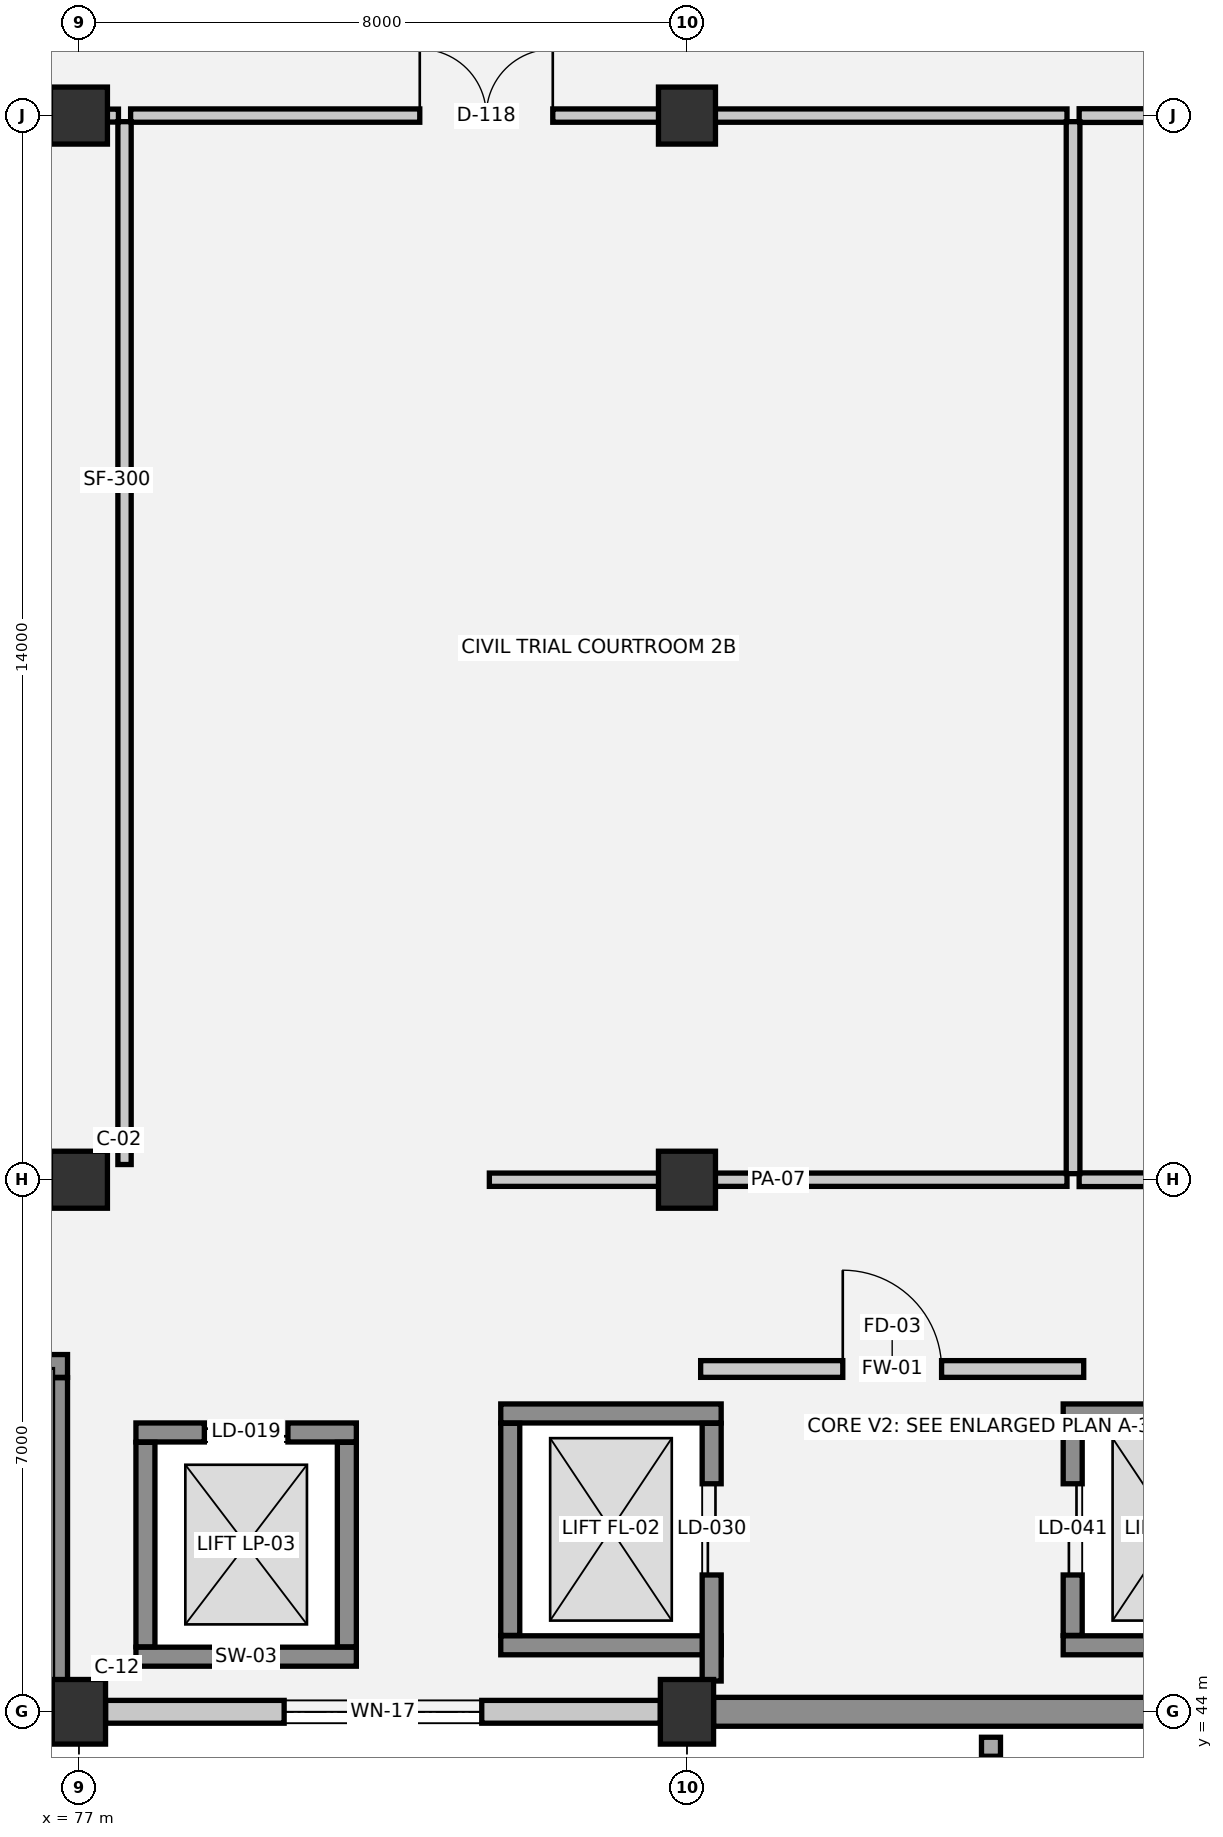
"""IFC4 building model, lengths in metres.
Left out: names, types, materials, properties, quantities, classifications, styles, units other than length and angle.
Written with IfcOpenShell. Run it as: python <this file> out.ifc"""

import sys

from ifc_helpers import new_model, si_unit, direction, frame, frame_2d, origin, origin_2d, place, context, subcontext, project, spatial, rectangle, extrude, element, fill, save


model = new_model("IFC4")
c1 = context("Model", 3, precision=1e-05, world=origin(), true_north=direction((0.0, 1.0)))
c2 = subcontext(c1, "Body", "Model", "MODEL_VIEW")
j1 = project(units=[si_unit("LENGTHUNIT", "METRE"), si_unit("PLANEANGLEUNIT", "RADIAN")], contexts=[c1])
p1 = place(None, origin())
s1 = spatial("IfcSite", under=j1, at=p1, CompositionType="ELEMENT")
p2 = place(p1, origin())
s2 = spatial("IfcBuilding", under=s1, at=p2, CompositionType="ELEMENT")
p3 = place(p2, frame((0.0, 0.0, 5.4)))
s3 = spatial("IfcBuildingStorey", under=s2, at=p3, CompositionType="ELEMENT", Elevation=5.4)
p4 = place(p3, frame((77.0, 44.0, 0.0), z_axis=(0.0, 0.0, 1.0), x_axis=(1.0, 0.0, 0.0)))
e1 = element("IfcColumn", 1, at=p4, inside=s3, PredefinedType="COLUMN", context=c2, shape_type="SweptSolid", body=[
    extrude(rectangle(XDim=0.7, YDim=0.85, at=origin_2d()), origin(), (0.0, 0.0, 1.0), 4.5),
])
for number, where, z_axis, x_axis in (
    (2, (77.0, 51.0, 0.0), (0.0, 0.0, 1.0), (1.0, 0.0, 0.0)),
    (3, (77.0, 65.0, 0.0), (0.0, 0.0, 1.0), (1.0, 0.0, 0.0)),
):
    element("IfcColumn", number, at=place(p3, frame(where, z_axis=z_axis, x_axis=x_axis)), inside=s3, PredefinedType="COLUMN", context=c2, shape_type="SweptSolid", body=[
        extrude(rectangle(XDim=0.75, YDim=0.75, at=origin_2d()), origin(), (0.0, 0.0, 1.0), 4.5),
    ])
p5 = place(p3, frame((85.0, 44.0, 0.0), z_axis=(0.0, 0.0, 1.0), x_axis=(1.0, 0.0, 0.0)))
e4 = element("IfcColumn", 4, at=p5, inside=s3, PredefinedType="COLUMN", context=c2, shape_type="SweptSolid", body=[
    extrude(rectangle(XDim=0.7, YDim=0.85, at=origin_2d()), origin(), (0.0, 0.0, 1.0), 4.5),
])
for number, where, z_axis, x_axis in (
    (5, (85.0, 51.0, 0.0), (0.0, 0.0, 1.0), (1.0, 0.0, 0.0)),
    (6, (85.0, 65.0, 0.0), (0.0, 0.0, 1.0), (1.0, 0.0, 0.0)),
):
    element("IfcColumn", number, at=place(p3, frame(where, z_axis=z_axis, x_axis=x_axis)), inside=s3, PredefinedType="COLUMN", context=c2, shape_type="SweptSolid", body=[
        extrude(rectangle(XDim=0.75, YDim=0.75, at=origin_2d()), origin(), (0.0, 0.0, 1.0), 4.5),
    ])
p6 = place(p3, frame((92.65, 44.0, 0.0), z_axis=(0.0, 0.0, 1.0), x_axis=(-1.0, 0.0, 0.0)))
e7 = element("IfcWall", 7, at=p6, inside=s3, PredefinedType="STANDARD", context=c2, shape_type="SweptSolid", body=[
    extrude(rectangle(XDim=7.3, YDim=0.38, at=frame_2d((3.65, 0.0))), origin(), (0.0, 0.0, 1.0), 3.23),
])
p7 = place(p3, frame((84.65, 44.0, 0.0), z_axis=(0.0, 0.0, 1.0), x_axis=(-1.0, 0.0, 0.0)))
e8 = element("IfcWall", 8, at=p7, inside=s3, PredefinedType="SOLIDWALL", context=c2, shape_type="SweptSolid", body=[
    extrude(rectangle(XDim=7.3, YDim=0.3, at=frame_2d((3.65, 0.0))), origin(), (0.0, 0.0, 1.0), 3.23),
])
p8 = place(p7, frame((2.35, 0.0, 1.0)))
e9 = element("IfcOpeningElement", 9, at=p8, cuts=e8, PredefinedType="OPENING", context=c2, shape_type="SweptSolid", body=[
    extrude(rectangle(XDim=2.6, YDim=1.1, at=frame_2d((1.3, 0.55))), frame((0.0, 0.16, 0.0), z_axis=(0.0, -1.0, 0.0), x_axis=(1.0, 0.0, 0.0)), (0.0, 0.0, 1.0), 0.32),
])
p9 = place(p3, frame((77.75, 44.725, 0.0), z_axis=(0.0, 0.0, 1.0), x_axis=(1.0, 0.0, 0.0)))
e10 = element("IfcWall", 10, at=p9, inside=s3, PredefinedType="SHEAR", context=c2, shape_type="SweptSolid", body=[
    extrude(rectangle(XDim=2.9, YDim=0.25, at=frame_2d((1.45, 0.0))), origin(), (0.0, 0.0, 1.0), 4.5),
])
p10 = place(p3, frame((80.65, 47.675, 0.0), z_axis=(0.0, 0.0, 1.0), x_axis=(-1.0, 0.0, 0.0)))
e11 = element("IfcWall", 11, at=p10, inside=s3, PredefinedType="SHEAR", context=c2, shape_type="SweptSolid", body=[
    extrude(rectangle(XDim=2.9, YDim=0.25, at=frame_2d((1.45, 0.0))), origin(), (0.0, 0.0, 1.0), 4.5),
])
p11 = place(p10, frame((0.9, 0.0, 0.0)))
e12 = element("IfcOpeningElement", 12, at=p11, cuts=e11, PredefinedType="OPENING", context=c2, shape_type="SweptSolid", body=[
    extrude(rectangle(XDim=1.1, YDim=2.15, at=frame_2d((0.55, 1.075))), frame((0.0, 0.135, 0.0), z_axis=(0.0, -1.0, 0.0), x_axis=(1.0, 0.0, 0.0)), (0.0, 0.0, 1.0), 0.27),
])
for number, where, z_axis, x_axis in (
    (13, (77.875, 47.545, 0.0), (0.0, 0.0, 1.0), (0.0, -1.0, 0.0)),
    (14, (80.525, 44.855, 0.0), (0.0, 0.0, 1.0), (0.0, 1.0, 0.0)),
):
    element("IfcWall", number, at=place(p3, frame(where, z_axis=z_axis, x_axis=x_axis)), inside=s3, PredefinedType="SHEAR", context=c2, shape_type="SweptSolid", body=[
        extrude(rectangle(XDim=2.69, YDim=0.25, at=frame_2d((1.345, 0.0))), origin(), (0.0, 0.0, 1.0), 4.5),
    ])
for number, where, z_axis, x_axis in (
    (15, (82.55, 44.875, 0.0), (0.0, 0.0, 1.0), (1.0, 0.0, 0.0)),
    (16, (85.45, 47.925, 0.0), (0.0, 0.0, 1.0), (-1.0, 0.0, 0.0)),
):
    element("IfcWall", number, at=place(p3, frame(where, z_axis=z_axis, x_axis=x_axis)), inside=s3, PredefinedType="SHEAR", context=c2, shape_type="SweptSolid", body=[
        extrude(rectangle(XDim=2.9, YDim=0.25, at=frame_2d((1.45, 0.0))), origin(), (0.0, 0.0, 1.0), 4.5),
    ])
p12 = place(p3, frame((82.675, 47.795, 0.0), z_axis=(0.0, 0.0, 1.0), x_axis=(0.0, -1.0, 0.0)))
e17 = element("IfcWall", 17, at=p12, inside=s3, PredefinedType="SHEAR", context=c2, shape_type="SweptSolid", body=[
    extrude(rectangle(XDim=2.79, YDim=0.25, at=frame_2d((1.395, 0.0))), origin(), (0.0, 0.0, 1.0), 4.5),
])
p13 = place(p3, frame((85.325, 44.405, 0.0), z_axis=(0.0, 0.0, 1.0), x_axis=(0.0, 1.0, 0.0)))
e18 = element("IfcWall", 18, at=p13, inside=s3, PredefinedType="SHEAR", context=c2, shape_type="SweptSolid", body=[
    extrude(rectangle(XDim=3.39, YDim=0.25, at=frame_2d((1.695, 0.0))), origin(), (0.0, 0.0, 1.0), 4.5),
])
p14 = place(p13, frame((1.395, 0.0, 0.0)))
e19 = element("IfcOpeningElement", 19, at=p14, cuts=e18, PredefinedType="OPENING", context=c2, shape_type="SweptSolid", body=[
    extrude(rectangle(XDim=1.2, YDim=2.2, at=frame_2d((0.6, 1.1))), frame((0.0, 0.135, 0.0), z_axis=(0.0, -1.0, 0.0), x_axis=(1.0, 0.0, 0.0)), (0.0, 0.0, 1.0), 0.27),
])
for number, where, z_axis, x_axis in (
    (20, (89.95, 44.875, 0.0), (0.0, 0.0, 1.0), (1.0, 0.0, 0.0)),
    (21, (92.85, 47.925, 0.0), (0.0, 0.0, 1.0), (-1.0, 0.0, 0.0)),
):
    element("IfcWall", number, at=place(p3, frame(where, z_axis=z_axis, x_axis=x_axis)), inside=s3, PredefinedType="SHEAR", context=c2, shape_type="SweptSolid", body=[
        extrude(rectangle(XDim=2.9, YDim=0.25, at=frame_2d((1.45, 0.0))), origin(), (0.0, 0.0, 1.0), 4.5),
    ])
p15 = place(p3, frame((90.075, 47.795, 0.0), z_axis=(0.0, 0.0, 1.0), x_axis=(0.0, -1.0, 0.0)))
e22 = element("IfcWall", 22, at=p15, inside=s3, PredefinedType="SHEAR", context=c2, shape_type="SweptSolid", body=[
    extrude(rectangle(XDim=2.79, YDim=0.25, at=frame_2d((1.395, 0.0))), origin(), (0.0, 0.0, 1.0), 4.5),
])
p16 = place(p15, frame((0.795, 0.0, 0.0)))
e23 = element("IfcOpeningElement", 23, at=p16, cuts=e22, PredefinedType="OPENING", context=c2, shape_type="SweptSolid", body=[
    extrude(rectangle(XDim=1.2, YDim=2.2, at=frame_2d((0.6, 1.1))), frame((0.0, 0.135, 0.0), z_axis=(0.0, -1.0, 0.0), x_axis=(1.0, 0.0, 0.0)), (0.0, 0.0, 1.0), 0.27),
])
p17 = place(p3, frame((76.85, 48.55, 0.0), z_axis=(0.0, 0.0, 1.0), x_axis=(-1.0, 0.0, 0.0)))
e24 = element("IfcWall", 24, at=p17, inside=s3, PredefinedType="SHEAR", context=c2, shape_type="SweptSolid", body=[
    extrude(rectangle(XDim=7.7, YDim=0.3, at=frame_2d((3.85, 0.0))), origin(), (0.0, 0.0, 1.0), 4.2),
])
p18 = place(p17, frame((6.025, 0.0, 0.0)))
e25 = element("IfcOpeningElement", 25, at=p18, cuts=e24, PredefinedType="OPENING", context=c2, shape_type="SweptSolid", body=[
    extrude(rectangle(XDim=1.25, YDim=2.15, at=frame_2d((0.625, 1.075))), frame((0.0, 0.16, 0.0), z_axis=(0.0, -1.0, 0.0), x_axis=(1.0, 0.0, 0.0)), (0.0, 0.0, 1.0), 0.32),
])
p19 = place(p3, frame((76.7, 44.195, 0.0), z_axis=(0.0, 0.0, 1.0), x_axis=(0.0, 1.0, 0.0)))
e26 = element("IfcWall", 26, at=p19, inside=s3, PredefinedType="SHEAR", context=c2, shape_type="SweptSolid", body=[
    extrude(rectangle(XDim=4.2, YDim=0.3, at=frame_2d((2.1, 0.0))), origin(), (0.0, 0.0, 1.0), 4.2),
])
p20 = place(p3, frame((85.18, 48.51, 0.0), z_axis=(0.0, 0.0, 1.0), x_axis=(1.0, 0.0, 0.0)))
e27 = element("IfcWall", 27, at=p20, inside=s3, PredefinedType="SOLIDWALL", context=c2, shape_type="SweptSolid", body=[
    extrude(rectangle(XDim=5.04, YDim=0.22, at=frame_2d((2.52, 0.0))), origin(), (0.0, 0.0, 1.0), 4.2),
])
p21 = place(p20, frame((1.87, 0.0, 0.0)))
e28 = element("IfcOpeningElement", 28, at=p21, cuts=e27, PredefinedType="OPENING", context=c2, shape_type="SweptSolid", body=[
    extrude(rectangle(XDim=1.3, YDim=2.15, at=frame_2d((0.65, 1.075))), frame((0.0, 0.12, 0.0), z_axis=(0.0, -1.0, 0.0), x_axis=(1.0, 0.0, 0.0)), (0.0, 0.0, 1.0), 0.24),
])
p22 = place(p3, frame((62.08, 51.0, 0.0), z_axis=(0.0, 0.0, 1.0), x_axis=(1.0, 0.0, 0.0)))
e29 = element("IfcWall", 29, at=p22, inside=s3, PredefinedType="PARTITIONING", context=c2, shape_type="SweptSolid", body=[
    extrude(rectangle(XDim=15.12, YDim=0.17, at=frame_2d((7.56, 0.0))), origin(), (0.0, 0.0, 1.0), 3.4),
])
p23 = place(p3, frame((82.4, 51.0, 0.0), z_axis=(0.0, 0.0, 1.0), x_axis=(1.0, 0.0, 0.0)))
e30 = element("IfcWall", 30, at=p23, inside=s3, PredefinedType="PARTITIONING", context=c2, shape_type="SweptSolid", body=[
    extrude(rectangle(XDim=7.6, YDim=0.175, at=frame_2d((3.8, 0.0))), origin(), (0.0, 0.0, 1.0), 3.4),
])
p24 = place(p3, frame((90.16, 51.0, 0.0), z_axis=(0.0, 0.0, 1.0), x_axis=(1.0, 0.0, 0.0)))
e31 = element("IfcWall", 31, at=p24, inside=s3, PredefinedType="PARTITIONING", context=c2, shape_type="SweptSolid", body=[
    extrude(rectangle(XDim=8.16, YDim=0.18, at=frame_2d((4.08, 0.0))), origin(), (0.0, 0.0, 1.0), 3.4),
])
p25 = place(p3, frame((62.08, 65.0, 0.0), z_axis=(0.0, 0.0, 1.0), x_axis=(1.0, 0.0, 0.0)))
e32 = element("IfcWall", 32, at=p25, inside=s3, PredefinedType="PARTITIONING", context=c2, shape_type="SweptSolid", body=[
    extrude(rectangle(XDim=15.44, YDim=0.17, at=frame_2d((7.72, 0.0))), origin(), (0.0, 0.0, 1.0), 3.4),
])
p26 = place(p25, frame((8.826, 0.0, 0.0)))
e33 = element("IfcOpeningElement", 33, at=p26, cuts=e32, PredefinedType="OPENING", context=c2, shape_type="SweptSolid", body=[
    extrude(rectangle(XDim=1.7, YDim=2.3, at=frame_2d((0.85, 1.15))), frame((0.0, 0.095, 0.0), z_axis=(0.0, -1.0, 0.0), x_axis=(1.0, 0.0, 0.0)), (0.0, 0.0, 1.0), 0.19),
])
p27 = place(p3, frame((77.68, 65.0, 0.0), z_axis=(0.0, 0.0, 1.0), x_axis=(1.0, 0.0, 0.0)))
e34 = element("IfcWall", 34, at=p27, inside=s3, PredefinedType="PARTITIONING", context=c2, shape_type="SweptSolid", body=[
    extrude(rectangle(XDim=12.32, YDim=0.175, at=frame_2d((6.16, 0.0))), origin(), (0.0, 0.0, 1.0), 3.4),
])
p28 = place(p27, frame((3.804, 0.0, 0.0)))
e35 = element("IfcOpeningElement", 35, at=p28, cuts=e34, PredefinedType="OPENING", context=c2, shape_type="SweptSolid", body=[
    extrude(rectangle(XDim=1.75, YDim=2.3, at=frame_2d((0.875, 1.15))), frame((0.0, 0.097, 0.0), z_axis=(0.0, -1.0, 0.0), x_axis=(1.0, 0.0, 0.0)), (0.0, 0.0, 1.0), 0.195),
])
p29 = place(p3, frame((90.16, 65.0, 0.0), z_axis=(0.0, 0.0, 1.0), x_axis=(1.0, 0.0, 0.0)))
e36 = element("IfcWall", 36, at=p29, inside=s3, PredefinedType="PARTITIONING", context=c2, shape_type="SweptSolid", body=[
    extrude(rectangle(XDim=8.16, YDim=0.18, at=frame_2d((4.08, 0.0))), origin(), (0.0, 0.0, 1.0), 3.4),
])
p30 = place(p3, frame((77.6, 51.2, 0.0), z_axis=(0.0, 0.0, 1.0), x_axis=(0.0, 1.0, 0.0)))
e37 = element("IfcWall", 37, at=p30, inside=s3, PredefinedType="PARTITIONING", context=c2, shape_type="SweptSolid", body=[
    extrude(rectangle(XDim=13.72, YDim=0.175, at=frame_2d((6.86, 0.0))), origin(), (0.0, 0.0, 1.0), 4.14),
])
p31 = place(p3, frame((90.08, 51.08, 0.0), z_axis=(0.0, 0.0, 1.0), x_axis=(0.0, 1.0, 0.0)))
e38 = element("IfcWall", 38, at=p31, inside=s3, PredefinedType="PARTITIONING", context=c2, shape_type="SweptSolid", body=[
    extrude(rectangle(XDim=13.84, YDim=0.18, at=frame_2d((6.92, 0.0))), origin(), (0.0, 0.0, 1.0), 4.14),
])
p32 = place(p8, origin())
e39 = element("IfcWindow", 39, at=p32, inside=s3, PartitioningType="SINGLE_PANEL", PredefinedType="WINDOW", context=c2, shape_type="SweptSolid", body=[
    extrude(rectangle(XDim=2.6, YDim=1.1, at=frame_2d((1.3, 0.55))), frame((0.0, 0.03, 0.0), z_axis=(0.0, -1.0, 0.0), x_axis=(1.0, 0.0, 0.0)), (0.0, 0.0, 1.0), 0.06),
])
fill(e9, e39)
p33 = place(p11, origin())
e40 = element("IfcDoor", 40, at=p33, inside=s3, OperationType="DOUBLE_DOOR_SLIDING", PredefinedType="DOOR", context=c2, shape_type="SweptSolid", body=[
    extrude(rectangle(XDim=1.1, YDim=2.15, at=frame_2d((0.55, 1.075))), frame((0.0, 0.025, 0.0), z_axis=(0.0, -1.0, 0.0), x_axis=(1.0, 0.0, 0.0)), (0.0, 0.0, 1.0), 0.05),
])
fill(e12, e40)
p34 = place(p14, origin())
e41 = element("IfcDoor", 41, at=p34, inside=s3, OperationType="DOUBLE_DOOR_SLIDING", PredefinedType="DOOR", context=c2, shape_type="SweptSolid", body=[
    extrude(rectangle(XDim=1.2, YDim=2.2, at=frame_2d((0.6, 1.1))), frame((0.0, 0.025, 0.0), z_axis=(0.0, -1.0, 0.0), x_axis=(1.0, 0.0, 0.0)), (0.0, 0.0, 1.0), 0.05),
])
fill(e19, e41)
p35 = place(p16, origin())
e42 = element("IfcDoor", 42, at=p35, inside=s3, OperationType="DOUBLE_DOOR_SLIDING", PredefinedType="DOOR", context=c2, shape_type="SweptSolid", body=[
    extrude(rectangle(XDim=1.2, YDim=2.2, at=frame_2d((0.6, 1.1))), frame((0.0, 0.025, 0.0), z_axis=(0.0, -1.0, 0.0), x_axis=(1.0, 0.0, 0.0)), (0.0, 0.0, 1.0), 0.05),
])
fill(e23, e42)
p36 = place(p21, origin())
e43 = element("IfcDoor", 43, at=p36, inside=s3, OperationType="SINGLE_SWING_LEFT", PredefinedType="DOOR", context=c2, shape_type="SweptSolid", body=[
    extrude(rectangle(XDim=1.3, YDim=2.15, at=frame_2d((0.65, 1.075))), frame((0.0, 0.025, 0.0), z_axis=(0.0, -1.0, 0.0), x_axis=(1.0, 0.0, 0.0)), (0.0, 0.0, 1.0), 0.05),
])
fill(e28, e43)
p37 = place(p28, origin())
e44 = element("IfcDoor", 44, at=p37, inside=s3, OperationType="DOUBLE_DOOR_SINGLE_SWING", PredefinedType="DOOR", context=c2, shape_type="SweptSolid", body=[
    extrude(rectangle(XDim=1.75, YDim=2.3, at=frame_2d((0.875, 1.15))), frame((0.0, 0.025, 0.0), z_axis=(0.0, -1.0, 0.0), x_axis=(1.0, 0.0, 0.0)), (0.0, 0.0, 1.0), 0.05),
])
fill(e35, e44)
save(model, sys.argv[1])
